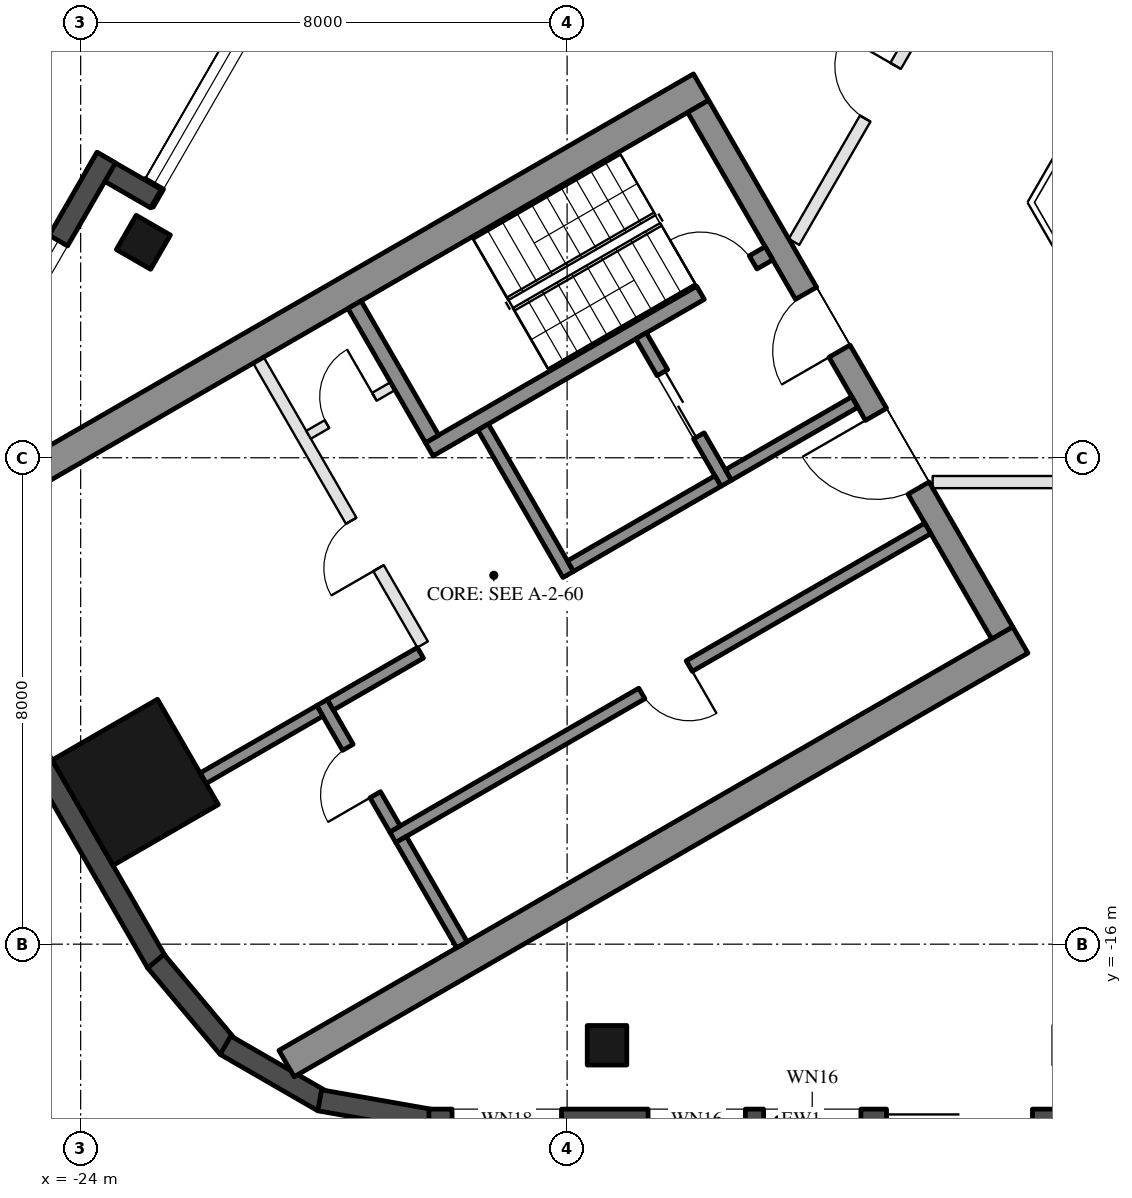
"""IFC4 building model, lengths in metres.
Left out: names, types, materials, properties, quantities, classifications, styles, units other than length and angle.
Written with IfcOpenShell. Run it as: python <this file> out.ifc"""

import sys

from ifc_helpers import new_model, si_unit, direction, frame, frame_2d, origin, origin_2d, place, context, subcontext, project, spatial, rectangle, hollow_rectangle, extrude, boolean, halfspace, element, fill, save


model = new_model("IFC4")
c1 = context("Model", 3, precision=1e-05, world=origin(), true_north=direction((0.0, 1.0)))
c2 = subcontext(c1, "Body", "Model", "MODEL_VIEW")
j1 = project(units=[si_unit("LENGTHUNIT", "METRE"), si_unit("PLANEANGLEUNIT", "RADIAN")], contexts=[c1])
p1 = place(None, origin())
s1 = spatial("IfcSite", under=j1, at=p1, CompositionType="ELEMENT")
p2 = place(p1, origin())
s2 = spatial("IfcBuilding", under=s1, at=p2, CompositionType="ELEMENT")
p3 = place(p2, frame((0.0, 0.0, 261.5)))
s3 = spatial("IfcBuildingStorey", under=s2, at=p3, CompositionType="ELEMENT", Elevation=261.5)
for number, where, z_axis, x_axis in (
    (1, (-15.344, -17.663, 0.0), (0.0, 0.0, 1.0), (-1.0, 0.0, 0.0)),
    (2, (-22.968, -4.457, 0.0), (0.0, 0.0, 1.0), (0.5, 0.866, 0.0)),
):
    element("IfcColumn", number, at=place(p3, frame(where, z_axis=z_axis, x_axis=x_axis)), inside=s3, PredefinedType="COLUMN", context=c2, shape_type="SweptSolid", body=[
        boolean("DIFFERENCE", extrude(hollow_rectangle(XDim=0.65, YDim=0.65, WallThickness=0.03, at=origin_2d()), origin(), (0.0, 0.0, 1.0), 3.7), halfspace(frame((0.0, 0.0, 3.653), z_axis=(0.0, 0.0, 1.0), x_axis=(1.0, 0.0, 0.0)), False)),
    ])
p4 = place(p3, frame((-23.102, -13.338, 0.0), z_axis=(0.0, 0.0, 1.0), x_axis=(-0.5, 0.866025403784, 0.0)))
e3 = element("IfcColumn", 3, at=p4, inside=s3, PredefinedType="COLUMN", context=c2, shape_type="SweptSolid", body=[
    boolean("DIFFERENCE", extrude(hollow_rectangle(XDim=2.0, YDim=2.0, WallThickness=0.05, at=origin_2d()), origin(), (0.0, 0.0, 1.0), 3.7), halfspace(frame((0.0, 0.0, 3.587), z_axis=(0.0, 0.0, 1.0), x_axis=(1.0, 0.0, 0.0)), False)),
])
p5 = place(p3, frame((-19.704, 1.848, 0.0), z_axis=(0.0, 0.0, 1.0), x_axis=(-0.499993986225, -0.866028875811, 0.0)))
e4 = element("IfcWall", 4, at=p5, inside=s3, PredefinedType="SOLIDWALL", context=c2, shape_type="SweptSolid", body=[
    extrude(rectangle(XDim=6.512, YDim=0.35, at=frame_2d((3.256, 0.0))), origin(), (0.0, 0.0, 1.0), 3.55),
])
p6 = place(p5, frame((0.77, 0.0, 0.0)))
e5 = element("IfcOpeningElement", 5, at=p6, cuts=e4, PredefinedType="OPENING", context=c2, shape_type="SweptSolid", body=[
    extrude(rectangle(XDim=2.4, YDim=2.4, at=frame_2d((1.2, 1.2))), frame((0.0, 0.185, 0.0), z_axis=(0.0, -1.0, 0.0), x_axis=(1.0, 0.0, 0.0)), (0.0, 0.0, 1.0), 0.37),
])
p7 = place(p5, frame((3.47, 0.0, 0.3)))
e6 = element("IfcOpeningElement", 6, at=p7, cuts=e4, PredefinedType="OPENING", context=c2, shape_type="SweptSolid", body=[
    extrude(rectangle(XDim=2.7, YDim=2.65, at=frame_2d((1.35, 1.325))), frame((0.0, 0.185, 0.0), z_axis=(0.0, -1.0, 0.0), x_axis=(1.0, 0.0, 0.0)), (0.0, 0.0, 1.0), 0.37),
])
p8 = place(p3, frame((-22.762, -3.739, 0.0), z_axis=(0.0, 0.0, 1.0), x_axis=(-0.866042269935, 0.499970785833, 0.0)))
e7 = element("IfcWall", 7, at=p8, inside=s3, PredefinedType="SOLIDWALL", context=c2, shape_type="SweptSolid", body=[
    extrude(rectangle(XDim=1.22, YDim=0.35, at=frame_2d((0.61, 0.0))), origin(), (0.0, 0.0, 1.0), 3.55),
])
p9 = place(p3, frame((-23.579, -3.065, 0.0), z_axis=(0.0, 0.0, 1.0), x_axis=(-0.500048109927, -0.865997625723, 0.0)))
e8 = element("IfcWall", 8, at=p9, inside=s3, PredefinedType="SOLIDWALL", context=c2, shape_type="SweptSolid", body=[
    extrude(rectangle(XDim=3.829, YDim=0.35, at=frame_2d((1.914, 0.0))), origin(), (0.0, 0.0, 1.0), 3.55),
])
p10 = place(p9, frame((1.575, 0.0, 0.3)))
e9 = element("IfcOpeningElement", 9, at=p10, cuts=e8, PredefinedType="OPENING", context=c2, shape_type="SweptSolid", body=[
    extrude(rectangle(XDim=0.8, YDim=2.65, at=frame_2d((0.4, 1.325))), frame((0.0, 0.185, 0.0), z_axis=(0.0, -1.0, 0.0), x_axis=(1.0, 0.0, 0.0)), (0.0, 0.0, 1.0), 0.37),
])
p11 = place(p3, frame((-25.494, -11.546, 0.0), z_axis=(0.0, 0.0, 1.0), x_axis=(0.500028854569, -0.86600874395, 0.0)))
e10 = element("IfcWall", 10, at=p11, inside=s3, PredefinedType="SOLIDWALL", context=c2, shape_type="SweptSolid", body=[
    extrude(rectangle(XDim=5.495, YDim=0.35, at=frame_2d((2.748, 0.0))), origin(), (0.0, 0.0, 1.0), 3.55),
])
for number, where, z_axis, x_axis in (
    (11, (-22.764, -16.28, 0.0), (0.0, 0.0, 1.0), (0.643, -0.766, 0.0)),
    (12, (-21.618, -17.662, 0.0), (0.0, 0.0, 1.0), (0.866, -0.5, 0.0)),
):
    element("IfcWall", number, at=place(p3, frame(where, z_axis=z_axis, x_axis=x_axis)), inside=s3, PredefinedType="SOLIDWALL", context=c2, shape_type="SweptSolid", body=[
        extrude(rectangle(XDim=1.855, YDim=0.35, at=frame_2d((0.927, 0.0))), origin(), (0.0, 0.0, 1.0), 3.55),
    ])
p12 = place(p3, frame((-20.069, -18.568, 0.0), z_axis=(0.0, 0.0, 1.0), x_axis=(0.984791508075, -0.173740282098, 0.0)))
e13 = element("IfcWall", 13, at=p12, inside=s3, PredefinedType="SOLIDWALL", context=c2, shape_type="SweptSolid", body=[
    extrude(rectangle(XDim=1.855, YDim=0.35, at=frame_2d((0.927, 0.0))), origin(), (0.0, 0.0, 1.0), 3.55),
])
p13 = place(p3, frame((-18.272, -18.888, 0.0), z_axis=(0.0, 0.0, 1.0), x_axis=(1.0, 0.0, 0.0)))
e14 = element("IfcWall", 14, at=p13, inside=s3, PredefinedType="SOLIDWALL", context=c2, shape_type="SweptSolid", body=[
    extrude(rectangle(XDim=11.5, YDim=0.35, at=frame_2d((5.75, 0.0))), origin(), (0.0, 0.0, 1.0), 3.55),
])
p14 = place(p13, frame((0.38, 0.0, 0.3)))
e15 = element("IfcOpeningElement", 15, at=p14, cuts=e14, PredefinedType="OPENING", context=c2, shape_type="SweptSolid", body=[
    extrude(rectangle(XDim=1.8, YDim=2.65, at=frame_2d((0.9, 1.325))), frame((0.0, 0.185, 0.0), z_axis=(0.0, -1.0, 0.0), x_axis=(1.0, 0.0, 0.0)), (0.0, 0.0, 1.0), 0.37),
])
p15 = place(p13, frame((7.525, 0.0, 0.0)))
e16 = element("IfcOpeningElement", 16, at=p15, cuts=e14, PredefinedType="OPENING", context=c2, shape_type="SweptSolid", body=[
    extrude(rectangle(XDim=2.4, YDim=2.4, at=frame_2d((1.2, 1.2))), frame((0.0, 0.185, 0.0), z_axis=(0.0, -1.0, 0.0), x_axis=(1.0, 0.0, 0.0)), (0.0, 0.0, 1.0), 0.37),
])
p16 = place(p13, frame((3.604, 0.0, 0.3)))
e17 = element("IfcOpeningElement", 17, at=p16, cuts=e14, PredefinedType="OPENING", context=c2, shape_type="SweptSolid", body=[
    extrude(rectangle(XDim=1.6, YDim=2.65, at=frame_2d((0.8, 1.325))), frame((0.0, 0.185, 0.0), z_axis=(0.0, -1.0, 0.0), x_axis=(1.0, 0.0, 0.0)), (0.0, 0.0, 1.0), 0.37),
])
p17 = place(p13, frame((5.504, 0.0, 0.3)))
e18 = element("IfcOpeningElement", 18, at=p17, cuts=e14, PredefinedType="OPENING", context=c2, shape_type="SweptSolid", body=[
    extrude(rectangle(XDim=1.6, YDim=2.65, at=frame_2d((0.8, 1.325))), frame((0.0, 0.185, 0.0), z_axis=(0.0, -1.0, 0.0), x_axis=(1.0, 0.0, 0.0)), (0.0, 0.0, 1.0), 0.37),
])
for number, where, z_axis, x_axis in (
    (19, (-13.797, -1.903, 0.0), (0.0, 0.0, 1.0), (-0.866, -0.5, 0.0)),
    (20, (-8.547, -10.997, 0.0), (0.0, 0.0, 1.0), (-0.866, -0.5, 0.0)),
):
    element("IfcWall", number, at=place(p3, frame(where, z_axis=z_axis, x_axis=x_axis)), inside=s3, PredefinedType="SHEAR", context=c2, shape_type="SweptSolid", body=[
        extrude(rectangle(XDim=13.934, YDim=0.5, at=frame_2d((6.967, 0.0))), origin(), (0.0, 0.0, 1.0), 3.5),
    ])
p18 = place(p3, frame((-13.845, -2.22, 0.0), z_axis=(0.0, 0.0, 1.0), x_axis=(0.500004234368, -0.866022959057, 0.0)))
e21 = element("IfcWall", 21, at=p18, inside=s3, PredefinedType="SHEAR", context=c2, shape_type="SweptSolid", body=[
    extrude(rectangle(XDim=10.0, YDim=0.4, at=frame_2d((5.0, 0.0))), origin(), (0.0, 0.0, 1.0), 3.5),
])
p19 = place(p18, frame((3.55, 0.0, 0.0)))
e22 = element("IfcOpeningElement", 22, at=p19, cuts=e21, PredefinedType="OPENING", context=c2, shape_type="SweptSolid", body=[
    extrude(rectangle(XDim=1.1, YDim=2.1, at=frame_2d((0.55, 1.05))), frame((0.0, 0.21, 0.0), z_axis=(0.0, -1.0, 0.0), x_axis=(1.0, 0.0, 0.0)), (0.0, 0.0, 1.0), 0.42),
])
p20 = place(p18, frame((5.85, 0.0, 0.0)))
e23 = element("IfcOpeningElement", 23, at=p20, cuts=e21, PredefinedType="OPENING", context=c2, shape_type="SweptSolid", body=[
    extrude(rectangle(XDim=1.4, YDim=2.1, at=frame_2d((0.7, 1.05))), frame((0.0, 0.21, 0.0), z_axis=(0.0, -1.0, 0.0), x_axis=(1.0, 0.0, 0.0)), (0.0, 0.0, 1.0), 0.42),
])
p21 = place(p3, frame((-12.681, -4.636, 0.0), z_axis=(0.0, 0.0, 1.0), x_axis=(-0.866021702275, -0.500006411147, 0.0)))
e24 = element("IfcWall", 24, at=p21, inside=s3, PredefinedType="SHEAR", context=c2, shape_type="SweptSolid", body=[
    extrude(rectangle(XDim=6.45, YDim=0.25, at=frame_2d((3.225, 0.0))), origin(), (0.0, 0.0, 1.0), 3.5),
])
p22 = place(p21, frame((0.3, 0.0, 0.0)))
e25 = element("IfcOpeningElement", 25, at=p22, cuts=e24, PredefinedType="OPENING", context=c2, shape_type="SweptSolid", body=[
    extrude(rectangle(XDim=1.0, YDim=2.1, at=frame_2d((0.5, 1.05))), frame((0.0, 0.135, 0.0), z_axis=(0.0, -1.0, 0.0), x_axis=(1.0, 0.0, 0.0)), (0.0, 0.0, 1.0), 0.27),
])
p23 = place(p3, frame((-19.496, -5.482, 0.0), z_axis=(0.0, 0.0, 1.0), x_axis=(0.499990435942, -0.866030925526, 0.0)))
e26 = element("IfcWall", 26, at=p23, inside=s3, PredefinedType="SHEAR", context=c2, shape_type="SweptSolid", body=[
    extrude(rectangle(XDim=2.55, YDim=0.25, at=frame_2d((1.275, 0.0))), origin(), (0.0, 0.0, 1.0), 3.5),
])
p24 = place(p3, frame((-17.381, -7.495, 0.0), z_axis=(0.0, 0.0, 1.0), x_axis=(0.500011755427, -0.866018616679, 0.0)))
e27 = element("IfcWall", 27, at=p24, inside=s3, PredefinedType="SHEAR", context=c2, shape_type="SweptSolid", body=[
    extrude(rectangle(XDim=2.8, YDim=0.2, at=frame_2d((1.4, 0.0))), origin(), (0.0, 0.0, 1.0), 3.5),
])
p25 = place(p3, frame((-14.783, -5.995, 0.0), z_axis=(0.0, 0.0, 1.0), x_axis=(0.49994636267, -0.866056369097, 0.0)))
e28 = element("IfcWall", 28, at=p25, inside=s3, PredefinedType="SHEAR", context=c2, shape_type="SweptSolid", body=[
    extrude(rectangle(XDim=2.8, YDim=0.2, at=frame_2d((1.4, 0.0))), origin(), (0.0, 0.0, 1.0), 3.5),
])
p26 = place(p25, frame((0.7, 0.0, 0.0)))
e29 = element("IfcOpeningElement", 29, at=p26, cuts=e28, PredefinedType="OPENING", context=c2, shape_type="SweptSolid", body=[
    extrude(rectangle(XDim=1.2, YDim=2.1, at=frame_2d((0.6, 1.05))), frame((0.0, 0.11, 0.0), z_axis=(0.0, -1.0, 0.0), x_axis=(1.0, 0.0, 0.0)), (0.0, 0.0, 1.0), 0.22),
])
p27 = place(p3, frame((-13.52, -8.383, 0.0), z_axis=(0.0, 0.0, 1.0), x_axis=(-0.866034573852, -0.49998411664, 0.0)))
e30 = element("IfcWall", 30, at=p27, inside=s3, PredefinedType="SHEAR", context=c2, shape_type="SweptSolid", body=[
    extrude(rectangle(XDim=2.8, YDim=0.2, at=frame_2d((1.4, 0.0))), origin(), (0.0, 0.0, 1.0), 3.5),
])
p28 = place(p3, frame((-11.268, -7.083, 0.0), z_axis=(0.0, 0.0, 1.0), x_axis=(-0.866050077142, -0.499957262057, 0.0)))
e31 = element("IfcWall", 31, at=p28, inside=s3, PredefinedType="SHEAR", context=c2, shape_type="SweptSolid", body=[
    extrude(rectangle(XDim=2.4, YDim=0.2, at=frame_2d((1.2, 0.0))), origin(), (0.0, 0.0, 1.0), 3.5),
])
p29 = place(p3, frame((-10.068, -9.162, 0.0), z_axis=(0.0, 0.0, 1.0), x_axis=(-0.866032725843, -0.499987317609, 0.0)))
e32 = element("IfcWall", 32, at=p29, inside=s3, PredefinedType="SHEAR", context=c2, shape_type="SweptSolid", body=[
    extrude(rectangle(XDim=10.16, YDim=0.2, at=frame_2d((5.08, 0.0))), origin(), (0.0, 0.0, 1.0), 3.5),
])
p30 = place(p29, frame((4.53, 0.0, 0.0)))
e33 = element("IfcOpeningElement", 33, at=p30, cuts=e32, PredefinedType="OPENING", context=c2, shape_type="SweptSolid", body=[
    extrude(rectangle(XDim=0.9, YDim=2.1, at=frame_2d((0.45, 1.05))), frame((0.0, 0.11, 0.0), z_axis=(0.0, -1.0, 0.0), x_axis=(1.0, 0.0, 0.0)), (0.0, 0.0, 1.0), 0.22),
])
p31 = place(p3, frame((-20.031, -12.026, 0.0), z_axis=(0.0, 0.0, 1.0), x_axis=(0.500033551112, -0.866006032174, 0.0)))
e34 = element("IfcWall", 34, at=p31, inside=s3, PredefinedType="SHEAR", context=c2, shape_type="SweptSolid", body=[
    extrude(rectangle(XDim=2.4, YDim=0.2, at=frame_2d((1.2, 0.0))), origin(), (0.0, 0.0, 1.0), 3.5),
])
p32 = place(p31, frame((0.85, 0.0, 0.0)))
e35 = element("IfcOpeningElement", 35, at=p32, cuts=e34, PredefinedType="OPENING", context=c2, shape_type="SweptSolid", body=[
    extrude(rectangle(XDim=0.9, YDim=2.1, at=frame_2d((0.45, 1.05))), frame((0.0, 0.11, 0.0), z_axis=(0.0, -1.0, 0.0), x_axis=(1.0, 0.0, 0.0)), (0.0, 0.0, 1.0), 0.22),
])
p33 = place(p3, frame((-18.413, -11.208, 0.0), z_axis=(0.0, 0.0, 1.0), x_axis=(-0.866038183914, -0.499977863513, 0.0)))
e36 = element("IfcWall", 36, at=p33, inside=s3, PredefinedType="SHEAR", context=c2, shape_type="SweptSolid", body=[
    extrude(rectangle(XDim=1.71, YDim=0.2, at=frame_2d((0.855, 0.0))), origin(), (0.0, 0.0, 1.0), 3.5),
])
p34 = place(p3, frame((-18.73, -14.278, 0.0), z_axis=(0.0, 0.0, 1.0), x_axis=(0.50002537861, -0.866010750942, 0.0)))
e37 = element("IfcWall", 37, at=p34, inside=s3, PredefinedType="SHEAR", context=c2, shape_type="SweptSolid", body=[
    extrude(rectangle(XDim=2.0, YDim=0.2, at=frame_2d((1.0, 0.0))), origin(), (0.0, 0.0, 1.0), 3.5),
])
p35 = place(p3, frame((-20.067, -12.163, 0.0), z_axis=(0.0, 0.0, 1.0), x_axis=(-0.866079196458, -0.49990681678, 0.0)))
e38 = element("IfcWall", 38, at=p35, inside=s3, PredefinedType="SHEAR", context=c2, shape_type="SweptSolid", body=[
    extrude(rectangle(XDim=2.216, YDim=0.2, at=frame_2d((1.108, 0.0))), origin(), (0.0, 0.0, 1.0), 3.5),
])
p36 = place(p3, frame((-21.076, -6.395, 0.0), z_axis=(0.0, 0.0, 1.0), x_axis=(0.50001468107, -0.866016927499, 0.0)))
e39 = element("IfcWall", 39, at=p36, inside=s3, PredefinedType="PARTITIONING", context=c2, shape_type="SweptSolid", body=[
    extrude(rectangle(XDim=5.4, YDim=0.2, at=frame_2d((2.7, 0.0))), origin(), (0.0, 0.0, 1.0), 3.5),
])
p37 = place(p36, frame((3.05, 0.0, 0.0)))
e40 = element("IfcOpeningElement", 40, at=p37, cuts=e39, PredefinedType="OPENING", context=c2, shape_type="SweptSolid", body=[
    extrude(rectangle(XDim=0.9, YDim=2.1, at=frame_2d((0.45, 1.05))), frame((0.0, 0.11, 0.0), z_axis=(0.0, -1.0, 0.0), x_axis=(1.0, 0.0, 0.0)), (0.0, 0.0, 1.0), 0.22),
])
p38 = place(p3, frame((-18.866, -6.822, 0.0), z_axis=(0.0, 0.0, 1.0), x_axis=(-0.866028054938, -0.499995408039, 0.0)))
e41 = element("IfcWall", 41, at=p38, inside=s3, PredefinedType="PARTITIONING", context=c2, shape_type="SweptSolid", body=[
    extrude(rectangle(XDim=1.6, YDim=0.15, at=frame_2d((0.8, 0.0))), origin(), (0.0, 0.0, 1.0), 3.5),
])
p39 = place(p38, frame((0.35, 0.0, 0.0)))
e42 = element("IfcOpeningElement", 42, at=p39, cuts=e41, PredefinedType="OPENING", context=c2, shape_type="SweptSolid", body=[
    extrude(rectangle(XDim=0.9, YDim=2.1, at=frame_2d((0.45, 1.05))), frame((0.0, 0.085, 0.0), z_axis=(0.0, -1.0, 0.0), x_axis=(1.0, 0.0, 0.0)), (0.0, 0.0, 1.0), 0.17),
])
p40 = place(p3, frame((-4.708, -8.4, 0.0), z_axis=(0.0, 0.0, 1.0), x_axis=(-1.0, 0.0, 0.0)))
e43 = element("IfcWall", 43, at=p40, inside=s3, PredefinedType="PARTITIONING", context=c2, shape_type="SweptSolid", body=[
    extrude(rectangle(XDim=5.281, YDim=0.2, at=frame_2d((2.64, 0.0))), origin(), (0.0, 0.0, 1.0), 3.0),
])
p41 = place(p40, frame((2.14, 0.0, 0.0)))
e44 = element("IfcOpeningElement", 44, at=p41, cuts=e43, PredefinedType="OPENING", context=c2, shape_type="SweptSolid", body=[
    extrude(rectangle(XDim=1.0, YDim=2.1, at=frame_2d((0.5, 1.05))), frame((0.0, 0.11, 0.0), z_axis=(0.0, -1.0, 0.0), x_axis=(1.0, 0.0, 0.0)), (0.0, 0.0, 1.0), 0.22),
])
p42 = place(p3, frame((-12.269, -4.45, 0.0), z_axis=(0.0, 0.0, 1.0), x_axis=(0.500009958894, 0.866019653938, 0.0)))
e45 = element("IfcWall", 45, at=p42, inside=s3, PredefinedType="PARTITIONING", context=c2, shape_type="SweptSolid", body=[
    extrude(rectangle(XDim=5.685, YDim=0.2, at=frame_2d((2.842, 0.0))), origin(), (0.0, 0.0, 1.0), 3.0),
])
p43 = place(p42, frame((2.342, 0.0, 0.0)))
e46 = element("IfcOpeningElement", 46, at=p43, cuts=e45, PredefinedType="OPENING", context=c2, shape_type="SweptSolid", body=[
    extrude(rectangle(XDim=1.0, YDim=2.1, at=frame_2d((0.5, 1.05))), frame((0.0, 0.11, 0.0), z_axis=(0.0, -1.0, 0.0), x_axis=(1.0, 0.0, 0.0)), (0.0, 0.0, 1.0), 0.22),
])
p44 = place(p7, origin())
e47 = element("IfcWindow", 47, at=p44, inside=s3, PartitioningType="SINGLE_PANEL", PredefinedType="WINDOW", context=c2, shape_type="SweptSolid", body=[
    extrude(rectangle(XDim=2.7, YDim=2.65, at=frame_2d((1.35, 1.325))), frame((0.0, 0.03, 0.0), z_axis=(0.0, -1.0, 0.0), x_axis=(1.0, 0.0, 0.0)), (0.0, 0.0, 1.0), 0.06),
])
fill(e6, e47)
p45 = place(p10, origin())
e48 = element("IfcWindow", 48, at=p45, inside=s3, PartitioningType="SINGLE_PANEL", PredefinedType="WINDOW", context=c2, shape_type="SweptSolid", body=[
    extrude(rectangle(XDim=0.8, YDim=2.65, at=frame_2d((0.4, 1.325))), frame((0.0, 0.03, 0.0), z_axis=(0.0, -1.0, 0.0), x_axis=(1.0, 0.0, 0.0)), (0.0, 0.0, 1.0), 0.06),
])
fill(e9, e48)
p46 = place(p26, origin())
e49 = element("IfcDoor", 49, at=p46, inside=s3, OperationType="DOUBLE_DOOR_SLIDING", PredefinedType="DOOR", context=c2, shape_type="SweptSolid", body=[
    extrude(rectangle(XDim=1.2, YDim=2.1, at=frame_2d((0.6, 1.05))), frame((0.0, 0.025, 0.0), z_axis=(0.0, -1.0, 0.0), x_axis=(1.0, 0.0, 0.0)), (0.0, 0.0, 1.0), 0.05),
])
fill(e29, e49)
p47 = place(p39, frame((0.9, 0.0, 0.0), z_axis=(0.0, 0.0, 1.0), x_axis=(-1.0, 0.0, 0.0)))
e50 = element("IfcDoor", 50, at=p47, inside=s3, OperationType="SINGLE_SWING_RIGHT", PredefinedType="DOOR", context=c2, shape_type="SweptSolid", body=[
    extrude(rectangle(XDim=0.9, YDim=2.1, at=frame_2d((0.45, 1.05))), frame((0.0, 0.025, 0.0), z_axis=(0.0, -1.0, 0.0), x_axis=(1.0, 0.0, 0.0)), (0.0, 0.0, 1.0), 0.05),
])
fill(e42, e50)
p48 = place(p30, origin())
e51 = element("IfcDoor", 51, at=p48, inside=s3, OperationType="SINGLE_SWING_LEFT", PredefinedType="DOOR", context=c2, shape_type="SweptSolid", body=[
    extrude(rectangle(XDim=0.9, YDim=2.1, at=frame_2d((0.45, 1.05))), frame((0.0, 0.025, 0.0), z_axis=(0.0, -1.0, 0.0), x_axis=(1.0, 0.0, 0.0)), (0.0, 0.0, 1.0), 0.05),
])
fill(e33, e51)
p49 = place(p32, frame((0.9, 0.0, 0.0), z_axis=(0.0, 0.0, 1.0), x_axis=(-1.0, 0.0, 0.0)))
e52 = element("IfcDoor", 52, at=p49, inside=s3, OperationType="SINGLE_SWING_LEFT", PredefinedType="DOOR", context=c2, shape_type="SweptSolid", body=[
    extrude(rectangle(XDim=0.9, YDim=2.1, at=frame_2d((0.45, 1.05))), frame((0.0, 0.025, 0.0), z_axis=(0.0, -1.0, 0.0), x_axis=(1.0, 0.0, 0.0)), (0.0, 0.0, 1.0), 0.05),
])
fill(e35, e52)
p50 = place(p37, frame((0.9, 0.0, 0.0), z_axis=(0.0, 0.0, 1.0), x_axis=(-1.0, 0.0, 0.0)))
e53 = element("IfcDoor", 53, at=p50, inside=s3, OperationType="SINGLE_SWING_LEFT", PredefinedType="DOOR", context=c2, shape_type="SweptSolid", body=[
    extrude(rectangle(XDim=0.9, YDim=2.1, at=frame_2d((0.45, 1.05))), frame((0.0, 0.025, 0.0), z_axis=(0.0, -1.0, 0.0), x_axis=(1.0, 0.0, 0.0)), (0.0, 0.0, 1.0), 0.05),
])
fill(e40, e53)
p51 = place(p19, frame((1.1, 0.0, 0.0), z_axis=(0.0, 0.0, 1.0), x_axis=(-1.0, 0.0, 0.0)))
e54 = element("IfcDoor", 54, at=p51, inside=s3, OperationType="SINGLE_SWING_LEFT", PredefinedType="DOOR", context=c2, shape_type="SweptSolid", body=[
    extrude(rectangle(XDim=1.1, YDim=2.1, at=frame_2d((0.55, 1.05))), frame((0.0, 0.025, 0.0), z_axis=(0.0, -1.0, 0.0), x_axis=(1.0, 0.0, 0.0)), (0.0, 0.0, 1.0), 0.05),
])
fill(e22, e54)
p52 = place(p20, frame((1.4, 0.0, 0.0), z_axis=(0.0, 0.0, 1.0), x_axis=(-1.0, 0.0, 0.0)))
e55 = element("IfcDoor", 55, at=p52, inside=s3, OperationType="DOUBLE_DOOR_SINGLE_SWING", PredefinedType="DOOR", context=c2, shape_type="SweptSolid", body=[
    extrude(rectangle(XDim=1.4, YDim=2.1, at=frame_2d((0.7, 1.05))), frame((0.0, 0.025, 0.0), z_axis=(0.0, -1.0, 0.0), x_axis=(1.0, 0.0, 0.0)), (0.0, 0.0, 1.0), 0.05),
])
fill(e23, e55)
p53 = place(p22, frame((1.0, 0.0, 0.0), z_axis=(0.0, 0.0, 1.0), x_axis=(-1.0, 0.0, 0.0)))
e56 = element("IfcDoor", 56, at=p53, inside=s3, OperationType="SINGLE_SWING_LEFT", PredefinedType="DOOR", context=c2, shape_type="SweptSolid", body=[
    extrude(rectangle(XDim=1.0, YDim=2.1, at=frame_2d((0.5, 1.05))), frame((0.0, 0.025, 0.0), z_axis=(0.0, -1.0, 0.0), x_axis=(1.0, 0.0, 0.0)), (0.0, 0.0, 1.0), 0.05),
])
fill(e25, e56)
p54 = place(p43, origin())
e57 = element("IfcDoor", 57, at=p54, inside=s3, OperationType="SINGLE_SWING_RIGHT", PredefinedType="DOOR", context=c2, shape_type="SweptSolid", body=[
    extrude(rectangle(XDim=1.0, YDim=2.1, at=frame_2d((0.5, 1.05))), frame((0.0, 0.025, 0.0), z_axis=(0.0, -1.0, 0.0), x_axis=(1.0, 0.0, 0.0)), (0.0, 0.0, 1.0), 0.05),
])
fill(e46, e57)
save(model, sys.argv[1])
